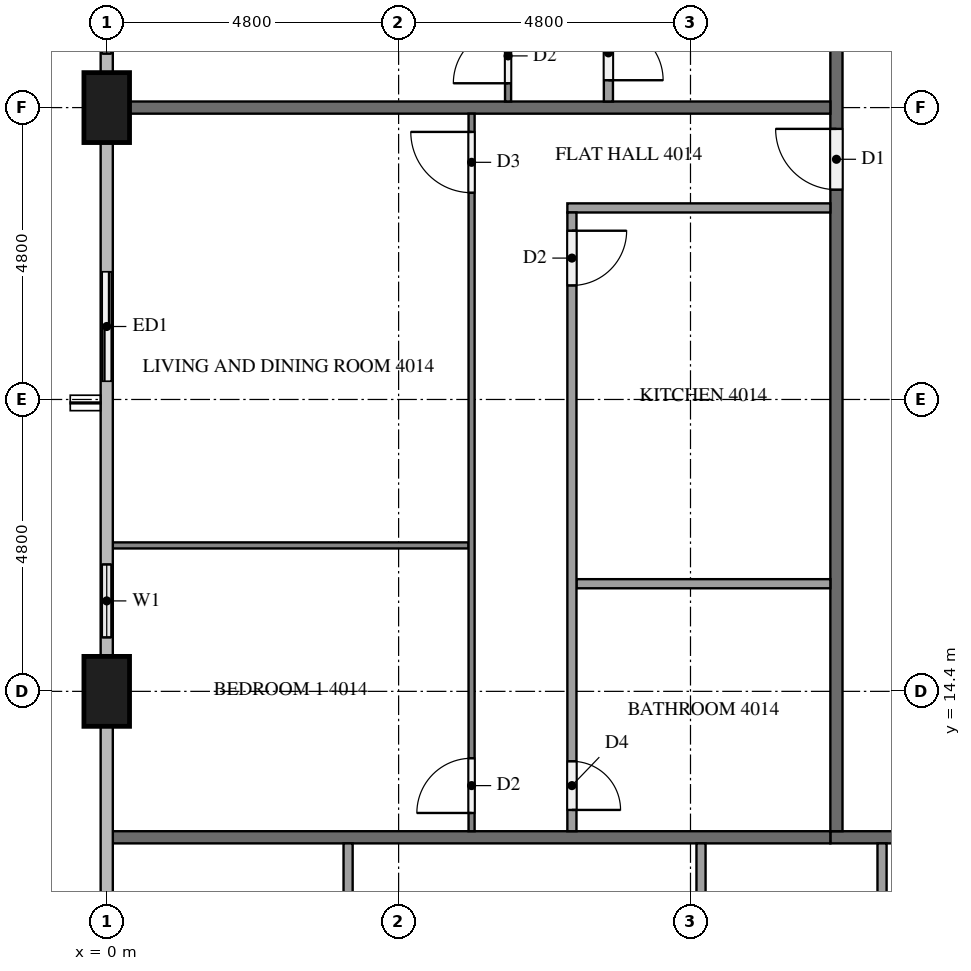
"""IFC4 building model, lengths in metres.
Left out: names, types, materials, properties, quantities, classifications, styles, units other than length and angle.
Written with IfcOpenShell. Run it as: python <this file> out.ifc"""

import sys

from ifc_helpers import new_model, si_unit, direction, frame, frame_2d, origin, origin_2d, place, context, subcontext, project, spatial, rectangle, extrude, element, fill, save


model = new_model("IFC4")
c1 = context("Model", 3, precision=1e-05, world=origin(), true_north=direction((0.0, 1.0)))
c2 = subcontext(c1, "Body", "Model", "MODEL_VIEW")
j1 = project(units=[si_unit("LENGTHUNIT", "METRE"), si_unit("PLANEANGLEUNIT", "RADIAN")], contexts=[c1])
p1 = place(None, origin())
s1 = spatial("IfcSite", under=j1, at=p1, CompositionType="ELEMENT")
p2 = place(p1, origin())
s2 = spatial("IfcBuilding", under=s1, at=p2, CompositionType="ELEMENT")
p3 = place(p2, frame((0.0, 0.0, 156.0)))
s3 = spatial("IfcBuildingStorey", under=s2, at=p3, CompositionType="ELEMENT", Elevation=156.0)
for number, where, z_axis, x_axis in (
    (1, (0.0, 24.0, 0.0), (0.0, 0.0, 1.0), (0.0, 1.0, 0.0)),
    (2, (0.0, 14.4, 0.0), (0.0, 0.0, 1.0), (0.0, 1.0, 0.0)),
):
    element("IfcColumn", number, at=place(p3, frame(where, z_axis=z_axis, x_axis=x_axis)), inside=s3, PredefinedType="COLUMN", context=c2, shape_type="SweptSolid", body=[
        extrude(rectangle(XDim=1.15, YDim=0.75, at=origin_2d()), origin(), (0.0, 0.0, 1.0), 3.2),
    ])
p4 = place(p3, frame((0.0, 26.4, 0.0), z_axis=(0.0, 0.0, 1.0), x_axis=(0.0, -1.0, 0.0)))
e3 = element("IfcWall", 3, at=p4, inside=s3, PredefinedType="SOLIDWALL", context=c2, shape_type="SweptSolid", body=[
    extrude(rectangle(XDim=1.825, YDim=0.15, at=frame_2d((0.913, 0.0))), origin(), (0.0, 0.0, 1.0), 3.2),
])
p5 = place(p4, frame((0.312, 0.0, 0.9)))
e4 = element("IfcOpeningElement", 4, at=p5, cuts=e3, PredefinedType="OPENING", context=c2, shape_type="SweptSolid", body=[
    extrude(rectangle(XDim=1.2, YDim=1.4, at=frame_2d((0.6, 0.7))), frame((0.0, 0.085, 0.0), z_axis=(0.0, -1.0, 0.0), x_axis=(1.0, 0.0, 0.0)), (0.0, 0.0, 1.0), 0.17),
])
p6 = place(p3, frame((0.0, 21.6, 0.0), z_axis=(0.0, 0.0, 1.0), x_axis=(0.0, -1.0, 0.0)))
e5 = element("IfcWall", 5, at=p6, inside=s3, PredefinedType="SOLIDWALL", context=c2, shape_type="SweptSolid", body=[
    extrude(rectangle(XDim=2.4, YDim=0.15, at=frame_2d((1.2, 0.0))), origin(), (0.0, 0.0, 1.0), 3.2),
])
p7 = place(p6, frame((0.3, 0.0, 0.0)))
e6 = element("IfcOpeningElement", 6, at=p7, cuts=e5, PredefinedType="OPENING", context=c2, shape_type="SweptSolid", body=[
    extrude(rectangle(XDim=1.8, YDim=2.4, at=frame_2d((0.9, 1.2))), frame((0.0, 0.085, 0.0), z_axis=(0.0, -1.0, 0.0), x_axis=(1.0, 0.0, 0.0)), (0.0, 0.0, 1.0), 0.17),
])
p8 = place(p3, frame((0.0, 16.8, 0.0), z_axis=(0.0, 0.0, 1.0), x_axis=(0.0, -1.0, 0.0)))
e7 = element("IfcWall", 7, at=p8, inside=s3, PredefinedType="SOLIDWALL", context=c2, shape_type="SweptSolid", body=[
    extrude(rectangle(XDim=1.825, YDim=0.15, at=frame_2d((0.913, 0.0))), origin(), (0.0, 0.0, 1.0), 3.2),
])
p9 = place(p8, frame((0.312, 0.0, 0.9)))
e8 = element("IfcOpeningElement", 8, at=p9, cuts=e7, PredefinedType="OPENING", context=c2, shape_type="SweptSolid", body=[
    extrude(rectangle(XDim=1.2, YDim=1.4, at=frame_2d((0.6, 0.7))), frame((0.0, 0.085, 0.0), z_axis=(0.0, -1.0, 0.0), x_axis=(1.0, 0.0, 0.0)), (0.0, 0.0, 1.0), 0.17),
])
p10 = place(p3, frame((50.5, 12.0, 0.0), z_axis=(0.0, 0.0, 1.0), x_axis=(-1.0, 0.0, 0.0)))
e9 = element("IfcWall", 9, at=p10, inside=s3, PredefinedType="PARTITIONING", context=c2, shape_type="SweptSolid", body=[
    extrude(rectangle(XDim=38.6, YDim=0.2, at=frame_2d((19.3, 0.0))), origin(), (0.0, 0.0, 1.0), 3.2),
])
p11 = place(p10, frame((36.45, 0.0, 0.0)))
e10 = element("IfcOpeningElement", 10, at=p11, cuts=e9, PredefinedType="OPENING", context=c2, shape_type="SweptSolid", body=[
    extrude(rectangle(XDim=1.0, YDim=2.1, at=frame_2d((0.5, 1.05))), frame((0.0, 0.11, 0.0), z_axis=(0.0, -1.0, 0.0), x_axis=(1.0, 0.0, 0.0)), (0.0, 0.0, 1.0), 0.22),
])
p12 = place(p10, frame((34.75, 0.0, 0.0)))
e11 = element("IfcOpeningElement", 11, at=p12, cuts=e9, PredefinedType="OPENING", context=c2, shape_type="SweptSolid", body=[
    extrude(rectangle(XDim=1.0, YDim=2.1, at=frame_2d((0.5, 1.05))), frame((0.0, 0.11, 0.0), z_axis=(0.0, -1.0, 0.0), x_axis=(1.0, 0.0, 0.0)), (0.0, 0.0, 1.0), 0.22),
])
p13 = place(p10, frame((10.05, 0.0, 0.0)))
e12 = element("IfcOpeningElement", 12, at=p13, cuts=e9, PredefinedType="OPENING", context=c2, shape_type="SweptSolid", body=[
    extrude(rectangle(XDim=1.0, YDim=2.1, at=frame_2d((0.5, 1.05))), frame((0.0, 0.11, 0.0), z_axis=(0.0, -1.0, 0.0), x_axis=(1.0, 0.0, 0.0)), (0.0, 0.0, 1.0), 0.22),
])
p14 = place(p10, frame((8.35, 0.0, 0.0)))
e13 = element("IfcOpeningElement", 13, at=p14, cuts=e9, PredefinedType="OPENING", context=c2, shape_type="SweptSolid", body=[
    extrude(rectangle(XDim=1.0, YDim=2.1, at=frame_2d((0.5, 1.05))), frame((0.0, 0.11, 0.0), z_axis=(0.0, -1.0, 0.0), x_axis=(1.0, 0.0, 0.0)), (0.0, 0.0, 1.0), 0.22),
])
p15 = place(p3, frame((12.0, 12.1, 0.0), z_axis=(0.0, 0.0, 1.0), x_axis=(0.0, 1.0, 0.0)))
e14 = element("IfcWall", 14, at=p15, inside=s3, PredefinedType="PARTITIONING", context=c2, shape_type="SweptSolid", body=[
    extrude(rectangle(XDim=28.6, YDim=0.2, at=frame_2d((14.3, 0.0))), origin(), (0.0, 0.0, 1.0), 3.2),
])
p16 = place(p15, frame((27.35, 0.0, 0.0)))
e15 = element("IfcOpeningElement", 15, at=p16, cuts=e14, PredefinedType="OPENING", context=c2, shape_type="SweptSolid", body=[
    extrude(rectangle(XDim=1.0, YDim=2.1, at=frame_2d((0.5, 1.05))), frame((0.0, 0.11, 0.0), z_axis=(0.0, -1.0, 0.0), x_axis=(1.0, 0.0, 0.0)), (0.0, 0.0, 1.0), 0.22),
])
p17 = place(p15, frame((20.15, 0.0, 0.0)))
e16 = element("IfcOpeningElement", 16, at=p17, cuts=e14, PredefinedType="OPENING", context=c2, shape_type="SweptSolid", body=[
    extrude(rectangle(XDim=1.0, YDim=2.1, at=frame_2d((0.5, 1.05))), frame((0.0, 0.11, 0.0), z_axis=(0.0, -1.0, 0.0), x_axis=(1.0, 0.0, 0.0)), (0.0, 0.0, 1.0), 0.22),
])
p18 = place(p15, frame((10.55, 0.0, 0.0)))
e17 = element("IfcOpeningElement", 17, at=p18, cuts=e14, PredefinedType="OPENING", context=c2, shape_type="SweptSolid", body=[
    extrude(rectangle(XDim=1.0, YDim=2.1, at=frame_2d((0.5, 1.05))), frame((0.0, 0.11, 0.0), z_axis=(0.0, -1.0, 0.0), x_axis=(1.0, 0.0, 0.0)), (0.0, 0.0, 1.0), 0.22),
])
p19 = place(p3, frame((0.1, 12.0, 0.0), z_axis=(0.0, 0.0, 1.0), x_axis=(1.0, 0.0, 0.0)))
e18 = element("IfcWall", 18, at=p19, inside=s3, PredefinedType="PARTITIONING", context=c2, shape_type="SweptSolid", body=[
    extrude(rectangle(XDim=11.8, YDim=0.2, at=frame_2d((5.9, 0.0))), origin(), (0.0, 0.0, 1.0), 3.2),
])
p20 = place(p3, frame((0.375, 24.0, 0.0), z_axis=(0.0, 0.0, 1.0), x_axis=(1.0, 0.0, 0.0)))
e19 = element("IfcWall", 19, at=p20, inside=s3, PredefinedType="PARTITIONING", context=c2, shape_type="SweptSolid", body=[
    extrude(rectangle(XDim=11.525, YDim=0.2, at=frame_2d((5.762, 0.0))), origin(), (0.0, 0.0, 1.0), 3.2),
])
for number, where, z_axis, x_axis in (
    (20, (9.773, 11.9, 0.0), (0.0, 0.0, 1.0), (0.0, -1.0, 0.0)),
    (21, (3.969, 11.9, 0.0), (0.0, 0.0, 1.0), (0.0, -1.0, 0.0)),
):
    element("IfcWall", number, at=place(p3, frame(where, z_axis=z_axis, x_axis=x_axis)), inside=s3, PredefinedType="PARTITIONING", context=c2, shape_type="SweptSolid", body=[
        extrude(rectangle(XDim=2.975, YDim=0.15, at=frame_2d((1.487, 0.0))), origin(), (0.0, 0.0, 1.0), 3.2),
    ])
p21 = place(p3, frame((12.75, 11.9, 0.0), z_axis=(0.0, 0.0, 1.0), x_axis=(0.0, -1.0, 0.0)))
e22 = element("IfcWall", 22, at=p21, inside=s3, PredefinedType="PARTITIONING", context=c2, shape_type="SweptSolid", body=[
    extrude(rectangle(XDim=3.125, YDim=0.15, at=frame_2d((1.562, 0.0))), origin(), (0.0, 0.0, 1.0), 3.2),
])
p22 = place(p3, frame((6.6, 24.1, 0.0), z_axis=(0.0, 0.0, 1.0), x_axis=(0.0, 1.0, 0.0)))
e23 = element("IfcWall", 23, at=p22, inside=s3, PredefinedType="PARTITIONING", context=c2, shape_type="SweptSolid", body=[
    extrude(rectangle(XDim=9.4, YDim=0.1, at=frame_2d((4.7, 0.0))), origin(), (0.0, 0.0, 1.0), 3.2),
])
p23 = place(p22, frame((8.1, 0.0, 0.0)))
e24 = element("IfcOpeningElement", 24, at=p23, cuts=e23, PredefinedType="OPENING", context=c2, shape_type="SweptSolid", body=[
    extrude(rectangle(XDim=1.0, YDim=2.1, at=frame_2d((0.5, 1.05))), frame((0.0, 0.06, 0.0), z_axis=(0.0, -1.0, 0.0), x_axis=(1.0, 0.0, 0.0)), (0.0, 0.0, 1.0), 0.12),
])
p24 = place(p22, frame((0.3, 0.0, 0.0)))
e25 = element("IfcOpeningElement", 25, at=p24, cuts=e23, PredefinedType="OPENING", context=c2, shape_type="SweptSolid", body=[
    extrude(rectangle(XDim=0.9, YDim=2.1, at=frame_2d((0.45, 1.05))), frame((0.0, 0.06, 0.0), z_axis=(0.0, -1.0, 0.0), x_axis=(1.0, 0.0, 0.0)), (0.0, 0.0, 1.0), 0.12),
])
p25 = place(p3, frame((8.25, 31.875, 0.0), z_axis=(0.0, 0.0, 1.0), x_axis=(0.0, -1.0, 0.0)))
e26 = element("IfcWall", 26, at=p25, inside=s3, PredefinedType="PARTITIONING", context=c2, shape_type="SweptSolid", body=[
    extrude(rectangle(XDim=7.775, YDim=0.15, at=frame_2d((3.887, 0.0))), origin(), (0.0, 0.0, 1.0), 3.2),
])
p26 = place(p25, frame((0.3, 0.0, 0.0)))
e27 = element("IfcOpeningElement", 27, at=p26, cuts=e26, PredefinedType="OPENING", context=c2, shape_type="SweptSolid", body=[
    extrude(rectangle(XDim=0.8, YDim=2.1, at=frame_2d((0.4, 1.05))), frame((0.0, 0.085, 0.0), z_axis=(0.0, -1.0, 0.0), x_axis=(1.0, 0.0, 0.0)), (0.0, 0.0, 1.0), 0.17),
])
p27 = place(p25, frame((6.525, 0.0, 0.0)))
e28 = element("IfcOpeningElement", 28, at=p27, cuts=e26, PredefinedType="OPENING", context=c2, shape_type="SweptSolid", body=[
    extrude(rectangle(XDim=0.9, YDim=2.1, at=frame_2d((0.45, 1.05))), frame((0.0, 0.085, 0.0), z_axis=(0.0, -1.0, 0.0), x_axis=(1.0, 0.0, 0.0)), (0.0, 0.0, 1.0), 0.17),
])
p28 = place(p3, frame((5.95, 16.8, 0.0), z_axis=(0.0, 0.0, 1.0), x_axis=(-1.0, 0.0, 0.0)))
e29 = element("IfcWall", 29, at=p28, inside=s3, PredefinedType="PARTITIONING", context=c2, shape_type="SweptSolid", body=[
    extrude(rectangle(XDim=5.85, YDim=0.1, at=frame_2d((2.925, 0.0))), origin(), (0.0, 0.0, 1.0), 3.2),
])
p29 = place(p3, frame((6.0, 12.1, 0.0), z_axis=(0.0, 0.0, 1.0), x_axis=(0.0, 1.0, 0.0)))
e30 = element("IfcWall", 30, at=p29, inside=s3, PredefinedType="PARTITIONING", context=c2, shape_type="SweptSolid", body=[
    extrude(rectangle(XDim=11.8, YDim=0.1, at=frame_2d((5.9, 0.0))), origin(), (0.0, 0.0, 1.0), 3.2),
])
p30 = place(p29, frame((10.5, 0.0, 0.0)))
e31 = element("IfcOpeningElement", 31, at=p30, cuts=e30, PredefinedType="OPENING", context=c2, shape_type="SweptSolid", body=[
    extrude(rectangle(XDim=1.0, YDim=2.1, at=frame_2d((0.5, 1.05))), frame((0.0, 0.06, 0.0), z_axis=(0.0, -1.0, 0.0), x_axis=(1.0, 0.0, 0.0)), (0.0, 0.0, 1.0), 0.12),
])
p31 = place(p29, frame((0.3, 0.0, 0.0)))
e32 = element("IfcOpeningElement", 32, at=p31, cuts=e30, PredefinedType="OPENING", context=c2, shape_type="SweptSolid", body=[
    extrude(rectangle(XDim=0.9, YDim=2.1, at=frame_2d((0.45, 1.05))), frame((0.0, 0.06, 0.0), z_axis=(0.0, -1.0, 0.0), x_axis=(1.0, 0.0, 0.0)), (0.0, 0.0, 1.0), 0.12),
])
p32 = place(p3, frame((11.9, 16.17, 0.0), z_axis=(0.0, 0.0, 1.0), x_axis=(-1.0, 0.0, 0.0)))
e33 = element("IfcWall", 33, at=p32, inside=s3, PredefinedType="PARTITIONING", context=c2, shape_type="SweptSolid", body=[
    extrude(rectangle(XDim=4.175, YDim=0.15, at=frame_2d((2.087, 0.0))), origin(), (0.0, 0.0, 1.0), 3.2),
])
p33 = place(p3, frame((11.9, 22.35, 0.0), z_axis=(0.0, 0.0, 1.0), x_axis=(-1.0, 0.0, 0.0)))
e34 = element("IfcWall", 34, at=p33, inside=s3, PredefinedType="PARTITIONING", context=c2, shape_type="SweptSolid", body=[
    extrude(rectangle(XDim=4.325, YDim=0.15, at=frame_2d((2.163, 0.0))), origin(), (0.0, 0.0, 1.0), 3.2),
])
p34 = place(p3, frame((7.65, 22.275, 0.0), z_axis=(0.0, 0.0, 1.0), x_axis=(0.0, -1.0, 0.0)))
e35 = element("IfcWall", 35, at=p34, inside=s3, PredefinedType="PARTITIONING", context=c2, shape_type="SweptSolid", body=[
    extrude(rectangle(XDim=10.175, YDim=0.15, at=frame_2d((5.087, 0.0))), origin(), (0.0, 0.0, 1.0), 3.2),
])
p35 = place(p34, frame((0.3, 0.0, 0.0)))
e36 = element("IfcOpeningElement", 36, at=p35, cuts=e35, PredefinedType="OPENING", context=c2, shape_type="SweptSolid", body=[
    extrude(rectangle(XDim=0.9, YDim=2.1, at=frame_2d((0.45, 1.05))), frame((0.0, 0.085, 0.0), z_axis=(0.0, -1.0, 0.0), x_axis=(1.0, 0.0, 0.0)), (0.0, 0.0, 1.0), 0.17),
])
p36 = place(p34, frame((9.025, 0.0, 0.0)))
e37 = element("IfcOpeningElement", 37, at=p36, cuts=e35, PredefinedType="OPENING", context=c2, shape_type="SweptSolid", body=[
    extrude(rectangle(XDim=0.8, YDim=2.1, at=frame_2d((0.4, 1.05))), frame((0.0, 0.085, 0.0), z_axis=(0.0, -1.0, 0.0), x_axis=(1.0, 0.0, 0.0)), (0.0, 0.0, 1.0), 0.17),
])
p37 = place(p5, origin())
e38 = element("IfcWindow", 38, at=p37, inside=s3, PartitioningType="SINGLE_PANEL", PredefinedType="WINDOW", context=c2, shape_type="SweptSolid", body=[
    extrude(rectangle(XDim=1.2, YDim=1.4, at=frame_2d((0.6, 0.7))), frame((0.0, 0.03, 0.0), z_axis=(0.0, -1.0, 0.0), x_axis=(1.0, 0.0, 0.0)), (0.0, 0.0, 1.0), 0.06),
])
fill(e4, e38)
p38 = place(p7, origin())
e39 = element("IfcDoor", 39, at=p38, inside=s3, OperationType="SLIDING_TO_LEFT", PredefinedType="DOOR", context=c2, shape_type="SweptSolid", body=[
    extrude(rectangle(XDim=1.8, YDim=2.4, at=frame_2d((0.9, 1.2))), frame((0.0, 0.025, 0.0), z_axis=(0.0, -1.0, 0.0), x_axis=(1.0, 0.0, 0.0)), (0.0, 0.0, 1.0), 0.05),
])
fill(e6, e39)
p39 = place(p9, origin())
e40 = element("IfcWindow", 40, at=p39, inside=s3, PartitioningType="SINGLE_PANEL", PredefinedType="WINDOW", context=c2, shape_type="SweptSolid", body=[
    extrude(rectangle(XDim=1.2, YDim=1.4, at=frame_2d((0.6, 0.7))), frame((0.0, 0.03, 0.0), z_axis=(0.0, -1.0, 0.0), x_axis=(1.0, 0.0, 0.0)), (0.0, 0.0, 1.0), 0.06),
])
fill(e8, e40)
p40 = place(p18, origin())
e41 = element("IfcDoor", 41, at=p40, inside=s3, OperationType="SINGLE_SWING_RIGHT", PredefinedType="DOOR", context=c2, shape_type="SweptSolid", body=[
    extrude(rectangle(XDim=1.0, YDim=2.1, at=frame_2d((0.5, 1.05))), frame((0.0, 0.025, 0.0), z_axis=(0.0, -1.0, 0.0), x_axis=(1.0, 0.0, 0.0)), (0.0, 0.0, 1.0), 0.05),
])
fill(e17, e41)
p41 = place(p24, origin())
e42 = element("IfcDoor", 42, at=p41, inside=s3, OperationType="SINGLE_SWING_LEFT", PredefinedType="DOOR", context=c2, shape_type="SweptSolid", body=[
    extrude(rectangle(XDim=0.9, YDim=2.1, at=frame_2d((0.45, 1.05))), frame((0.0, 0.025, 0.0), z_axis=(0.0, -1.0, 0.0), x_axis=(1.0, 0.0, 0.0)), (0.0, 0.0, 1.0), 0.05),
])
fill(e25, e42)
p42 = place(p27, origin())
e43 = element("IfcDoor", 43, at=p42, inside=s3, OperationType="SINGLE_SWING_RIGHT", PredefinedType="DOOR", context=c2, shape_type="SweptSolid", body=[
    extrude(rectangle(XDim=0.9, YDim=2.1, at=frame_2d((0.45, 1.05))), frame((0.0, 0.025, 0.0), z_axis=(0.0, -1.0, 0.0), x_axis=(1.0, 0.0, 0.0)), (0.0, 0.0, 1.0), 0.05),
])
fill(e28, e43)
p43 = place(p30, origin())
e44 = element("IfcDoor", 44, at=p43, inside=s3, OperationType="SINGLE_SWING_RIGHT", PredefinedType="DOOR", context=c2, shape_type="SweptSolid", body=[
    extrude(rectangle(XDim=1.0, YDim=2.1, at=frame_2d((0.5, 1.05))), frame((0.0, 0.025, 0.0), z_axis=(0.0, -1.0, 0.0), x_axis=(1.0, 0.0, 0.0)), (0.0, 0.0, 1.0), 0.05),
])
fill(e31, e44)
p44 = place(p31, origin())
e45 = element("IfcDoor", 45, at=p44, inside=s3, OperationType="SINGLE_SWING_LEFT", PredefinedType="DOOR", context=c2, shape_type="SweptSolid", body=[
    extrude(rectangle(XDim=0.9, YDim=2.1, at=frame_2d((0.45, 1.05))), frame((0.0, 0.025, 0.0), z_axis=(0.0, -1.0, 0.0), x_axis=(1.0, 0.0, 0.0)), (0.0, 0.0, 1.0), 0.05),
])
fill(e32, e45)
p45 = place(p35, origin())
e46 = element("IfcDoor", 46, at=p45, inside=s3, OperationType="SINGLE_SWING_LEFT", PredefinedType="DOOR", context=c2, shape_type="SweptSolid", body=[
    extrude(rectangle(XDim=0.9, YDim=2.1, at=frame_2d((0.45, 1.05))), frame((0.0, 0.025, 0.0), z_axis=(0.0, -1.0, 0.0), x_axis=(1.0, 0.0, 0.0)), (0.0, 0.0, 1.0), 0.05),
])
fill(e36, e46)
p46 = place(p36, origin())
e47 = element("IfcDoor", 47, at=p46, inside=s3, OperationType="SINGLE_SWING_RIGHT", PredefinedType="DOOR", context=c2, shape_type="SweptSolid", body=[
    extrude(rectangle(XDim=0.8, YDim=2.1, at=frame_2d((0.4, 1.05))), frame((0.0, 0.025, 0.0), z_axis=(0.0, -1.0, 0.0), x_axis=(1.0, 0.0, 0.0)), (0.0, 0.0, 1.0), 0.05),
])
fill(e37, e47)
save(model, sys.argv[1])
